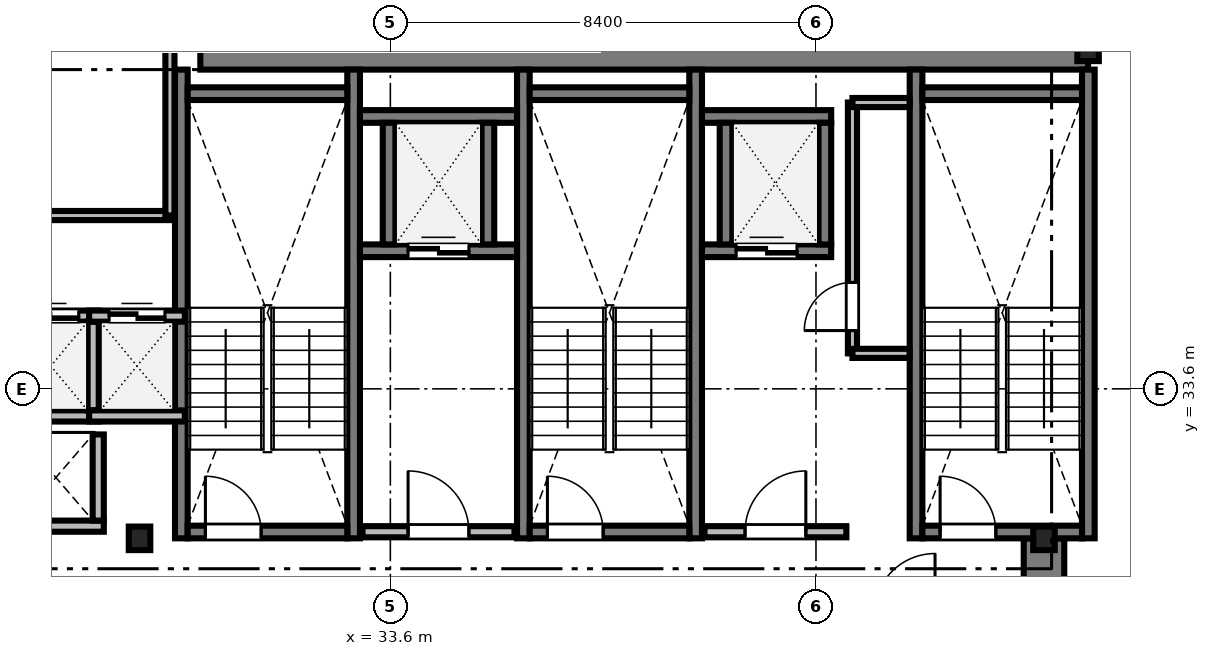
"""IFC4 building model, lengths in metres.
Left out: names, types, materials, properties, quantities, classifications, styles, units other than length and angle.
Written with IfcOpenShell. Run it as: python <this file> out.ifc"""

import sys

from ifc_helpers import new_model, si_unit, direction, frame, frame_2d, origin, origin_2d, place, context, subcontext, project, spatial, rectangle, i_section, extrude, source, transform, mapped, element, fill, save


model = new_model("IFC4")
c1 = context("Model", 3, precision=1e-05, world=origin(), true_north=direction((0.0, 1.0)))
c2 = subcontext(c1, "Body", "Model", "MODEL_VIEW")
j1 = project(units=[si_unit("LENGTHUNIT", "METRE"), si_unit("PLANEANGLEUNIT", "RADIAN")], contexts=[c1])
p1 = place(None, origin())
s1 = spatial("IfcSite", under=j1, at=p1, CompositionType="ELEMENT")
p2 = place(p1, origin())
s2 = spatial("IfcBuilding", under=s1, at=p2, CompositionType="ELEMENT")
p3 = place(p2, frame((0.0, 0.0, 155.7)))
s3 = spatial("IfcBuildingStorey", under=s2, at=p3, CompositionType="ELEMENT", Elevation=155.7)
m1 = source(origin(), c2, "Body", "SweptSolid", [
    extrude(rectangle(XDim=17.52, YDim=0.8, at=frame_2d((8.76, 0.0))), origin(), (0.0, 0.0, 1.0), 3.46),
])
p4 = place(p3, frame((29.85, 40.3, 0.0), z_axis=(0.0, 0.0, 1.0), x_axis=(1.0, 0.0, 0.0)))
e1 = element("IfcWall", 1, at=p4, inside=s3, PredefinedType="SHEAR", context=c2, shape_type="MappedRepresentation", body=[
    mapped(m1, transform((0.0, 0.0, 0.0), scale=1.0)),
])
m2 = source(origin(), c2, "Body", "SweptSolid", [
    extrude(rectangle(XDim=13.15, YDim=0.8, at=frame_2d((6.575, 0.0))), origin(), (0.0, 0.0, 1.0), 3.46),
])
p5 = place(p3, frame((46.5, 17.5, 0.0), z_axis=(0.0, 0.0, 1.0), x_axis=(0.0, 1.0, 0.0)))
e2 = element("IfcWall", 2, at=p5, inside=s3, PredefinedType="SHEAR", context=c2, shape_type="MappedRepresentation", body=[
    mapped(m2, transform((0.0, 0.0, 0.0), scale=1.0)),
])
m3 = source(origin(), c2, "Body", "SweptSolid", [
    extrude(i_section(OverallWidth=0.424, OverallDepth=0.465, WebThickness=0.035, FlangeThickness=0.056, FilletRadius=0.015, at=origin_2d()), origin(), (0.0, 0.0, 1.0), 3.46),
])
for number, where, z_axis, x_axis in (
    (3, (28.65, 30.65, 0.0), (0.0, 0.0, 1.0), (1.0, 0.0, 0.0)),
    (4, (46.5, 30.65, 0.0), (0.0, 0.0, 1.0), (1.0, 0.0, 0.0)),
    (5, (47.37, 40.3, 0.0), (0.0, 0.0, 1.0), (1.0, 0.0, 0.0)),
):
    element("IfcColumn", number, at=place(p3, frame(where, z_axis=z_axis, x_axis=x_axis)), inside=s3, PredefinedType="COLUMN", context=c2, shape_type="MappedRepresentation", body=[
        mapped(m3, transform((0.0, 0.0, 0.0), scale=1.0)),
    ])
m4 = source(origin(), c2, "Body", "SweptSolid", [
    extrude(rectangle(XDim=9.25, YDim=0.25, at=frame_2d((4.625, 0.0))), origin(), (0.0, 0.0, 1.0), 3.5),
])
for number, where, z_axis, x_axis in (
    (6, (29.475, 30.65, 0.0), (0.0, 0.0, 1.0), (0.0, 1.0, 0.0)),
    (7, (32.875, 30.65, 0.0), (0.0, 0.0, 1.0), (0.0, 1.0, 0.0)),
):
    element("IfcWall", number, at=place(p3, frame(where, z_axis=z_axis, x_axis=x_axis)), inside=s3, PredefinedType="SOLIDWALL", context=c2, shape_type="MappedRepresentation", body=[
        mapped(m4, transform((0.0, 0.0, 0.0), scale=1.0)),
    ])
m5 = source(origin(), c2, "Body", "SweptSolid", [
    extrude(rectangle(XDim=3.15, YDim=0.25, at=frame_2d((1.575, 0.0))), origin(), (0.0, 0.0, 1.0), 3.5),
])
p6 = place(p3, frame((29.6, 39.425, 0.0), z_axis=(0.0, 0.0, 1.0), x_axis=(1.0, 0.0, 0.0)))
e8 = element("IfcWall", 8, at=p6, inside=s3, PredefinedType="SOLIDWALL", context=c2, shape_type="MappedRepresentation", body=[
    mapped(m5, transform((0.0, 0.0, 0.0), scale=1.0)),
])
p7 = place(p3, frame((29.6, 30.775, 0.0), z_axis=(0.0, 0.0, 1.0), x_axis=(1.0, 0.0, 0.0)))
e9 = element("IfcWall", 9, at=p7, inside=s3, PredefinedType="SOLIDWALL", context=c2, shape_type="MappedRepresentation", body=[
    mapped(m5, transform((0.0, 0.0, 0.0), scale=1.0)),
])
m6 = source(origin(), c2, "Body", "SweptSolid", [
    extrude(rectangle(XDim=1.1, YDim=2.2, at=frame_2d((0.55, 1.1))), frame((0.0, 0.135, 0.0), z_axis=(0.0, -1.0, 0.0), x_axis=(1.0, 0.0, 0.0)), (0.0, 0.0, 1.0), 0.27),
])
p8 = place(p7, frame((0.35, 0.0, 0.0)))
e10 = element("IfcOpeningElement", 10, at=p8, cuts=e9, PredefinedType="OPENING", context=c2, shape_type="MappedRepresentation", body=[
    mapped(m6, transform((0.0, 0.0, 0.0), scale=1.0)),
])
for number, where, z_axis, x_axis in (
    (11, (36.225, 30.65, 0.0), (0.0, 0.0, 1.0), (0.0, 1.0, 0.0)),
    (12, (39.625, 30.65, 0.0), (0.0, 0.0, 1.0), (0.0, 1.0, 0.0)),
):
    element("IfcWall", number, at=place(p3, frame(where, z_axis=z_axis, x_axis=x_axis)), inside=s3, PredefinedType="SOLIDWALL", context=c2, shape_type="MappedRepresentation", body=[
        mapped(m4, transform((0.0, 0.0, 0.0), scale=1.0)),
    ])
p9 = place(p3, frame((36.35, 39.425, 0.0), z_axis=(0.0, 0.0, 1.0), x_axis=(1.0, 0.0, 0.0)))
e13 = element("IfcWall", 13, at=p9, inside=s3, PredefinedType="SOLIDWALL", context=c2, shape_type="MappedRepresentation", body=[
    mapped(m5, transform((0.0, 0.0, 0.0), scale=1.0)),
])
p10 = place(p3, frame((36.35, 30.775, 0.0), z_axis=(0.0, 0.0, 1.0), x_axis=(1.0, 0.0, 0.0)))
e14 = element("IfcWall", 14, at=p10, inside=s3, PredefinedType="SOLIDWALL", context=c2, shape_type="MappedRepresentation", body=[
    mapped(m5, transform((0.0, 0.0, 0.0), scale=1.0)),
])
p11 = place(p10, frame((0.35, 0.0, 0.0)))
e15 = element("IfcOpeningElement", 15, at=p11, cuts=e14, PredefinedType="OPENING", context=c2, shape_type="MappedRepresentation", body=[
    mapped(m6, transform((0.0, 0.0, 0.0), scale=1.0)),
])
for number, where, z_axis, x_axis in (
    (16, (43.975, 30.65, 0.0), (0.0, 0.0, 1.0), (0.0, 1.0, 0.0)),
    (17, (47.375, 30.65, 0.0), (0.0, 0.0, 1.0), (0.0, 1.0, 0.0)),
):
    element("IfcWall", number, at=place(p3, frame(where, z_axis=z_axis, x_axis=x_axis)), inside=s3, PredefinedType="SOLIDWALL", context=c2, shape_type="MappedRepresentation", body=[
        mapped(m4, transform((0.0, 0.0, 0.0), scale=1.0)),
    ])
p12 = place(p3, frame((44.1, 39.425, 0.0), z_axis=(0.0, 0.0, 1.0), x_axis=(1.0, 0.0, 0.0)))
e18 = element("IfcWall", 18, at=p12, inside=s3, PredefinedType="SOLIDWALL", context=c2, shape_type="MappedRepresentation", body=[
    mapped(m5, transform((0.0, 0.0, 0.0), scale=1.0)),
])
p13 = place(p3, frame((44.1, 30.775, 0.0), z_axis=(0.0, 0.0, 1.0), x_axis=(1.0, 0.0, 0.0)))
e19 = element("IfcWall", 19, at=p13, inside=s3, PredefinedType="SOLIDWALL", context=c2, shape_type="MappedRepresentation", body=[
    mapped(m5, transform((0.0, 0.0, 0.0), scale=1.0)),
])
p14 = place(p13, frame((0.35, 0.0, 0.0)))
e20 = element("IfcOpeningElement", 20, at=p14, cuts=e19, PredefinedType="OPENING", context=c2, shape_type="MappedRepresentation", body=[
    mapped(m6, transform((0.0, 0.0, 0.0), scale=1.0)),
])
m7 = source(origin(), c2, "Body", "SweptSolid", [
    extrude(rectangle(XDim=3.0, YDim=0.22, at=frame_2d((1.5, 0.0))), origin(), (0.0, 0.0, 1.0), 3.46),
])
p15 = place(p3, frame((33.05, 30.78, 0.0), z_axis=(0.0, 0.0, 1.0), x_axis=(1.0, 0.0, 0.0)))
e21 = element("IfcWall", 21, at=p15, inside=s3, PredefinedType="SOLIDWALL", context=c2, shape_type="MappedRepresentation", body=[
    mapped(m7, transform((0.0, 0.0, 0.0), scale=1.0)),
])
m8 = source(origin(), c2, "Body", "SweptSolid", [
    extrude(rectangle(XDim=1.2, YDim=2.2, at=frame_2d((0.6, 1.1))), frame((0.0, 0.12, 0.0), z_axis=(0.0, -1.0, 0.0), x_axis=(1.0, 0.0, 0.0)), (0.0, 0.0, 1.0), 0.24),
])
p16 = place(p15, frame((0.9, 0.0, 0.0)))
e22 = element("IfcOpeningElement", 22, at=p16, cuts=e21, PredefinedType="OPENING", context=c2, shape_type="MappedRepresentation", body=[
    mapped(m8, transform((0.0, 0.0, 0.0), scale=1.0)),
])
m9 = source(origin(), c2, "Body", "SweptSolid", [
    extrude(rectangle(XDim=2.8, YDim=0.22, at=frame_2d((1.4, 0.0))), origin(), (0.0, 0.0, 1.0), 3.46),
])
p17 = place(p3, frame((39.8, 30.78, 0.0), z_axis=(0.0, 0.0, 1.0), x_axis=(1.0, 0.0, 0.0)))
e23 = element("IfcWall", 23, at=p17, inside=s3, PredefinedType="SOLIDWALL", context=c2, shape_type="MappedRepresentation", body=[
    mapped(m9, transform((0.0, 0.0, 0.0), scale=1.0)),
])
p18 = place(p17, frame((0.8, 0.0, 0.0)))
e24 = element("IfcOpeningElement", 24, at=p18, cuts=e23, PredefinedType="OPENING", context=c2, shape_type="MappedRepresentation", body=[
    mapped(m8, transform((0.0, 0.0, 0.0), scale=1.0)),
])
m10 = source(origin(), c2, "Body", "SweptSolid", [
    extrude(rectangle(XDim=1.89, YDim=0.22, at=frame_2d((0.945, 0.0))), origin(), (0.0, 0.0, 1.0), 3.46),
])
p19 = place(p3, frame((25.955, 33.065, 0.0), z_axis=(0.0, 0.0, 1.0), x_axis=(1.0, 0.0, 0.0)))
e25 = element("IfcWall", 25, at=p19, inside=s3, PredefinedType="SOLIDWALL", context=c2, shape_type="MappedRepresentation", body=[
    mapped(m10, transform((0.0, 0.0, 0.0), scale=1.0)),
])
p20 = place(p3, frame((25.955, 35.035, 0.0), z_axis=(0.0, 0.0, 1.0), x_axis=(1.0, 0.0, 0.0)))
e26 = element("IfcWall", 26, at=p20, inside=s3, PredefinedType="SOLIDWALL", context=c2, shape_type="MappedRepresentation", body=[
    mapped(m10, transform((0.0, 0.0, 0.0), scale=1.0)),
])
m11 = source(origin(), c2, "Body", "SweptSolid", [
    extrude(rectangle(XDim=1.1, YDim=2.2, at=frame_2d((0.55, 1.1))), frame((0.0, 0.12, 0.0), z_axis=(0.0, -1.0, 0.0), x_axis=(1.0, 0.0, 0.0)), (0.0, 0.0, 1.0), 0.24),
])
p21 = place(p20, frame((0.395, 0.0, 0.0)))
e27 = element("IfcOpeningElement", 27, at=p21, cuts=e26, PredefinedType="OPENING", context=c2, shape_type="MappedRepresentation", body=[
    mapped(m11, transform((0.0, 0.0, 0.0), scale=1.0)),
])
m12 = source(origin(), c2, "Body", "SweptSolid", [
    extrude(rectangle(XDim=1.75, YDim=0.22, at=frame_2d((0.875, 0.0))), origin(), (0.0, 0.0, 1.0), 3.46),
])
p22 = place(p3, frame((27.735, 33.175, 0.0), z_axis=(0.0, 0.0, 1.0), x_axis=(0.0, 1.0, 0.0)))
e28 = element("IfcWall", 28, at=p22, inside=s3, PredefinedType="SOLIDWALL", context=c2, shape_type="MappedRepresentation", body=[
    mapped(m12, transform((0.0, 0.0, 0.0), scale=1.0)),
])
p23 = place(p3, frame((27.655, 33.065, 0.0), z_axis=(0.0, 0.0, 1.0), x_axis=(1.0, 0.0, 0.0)))
e29 = element("IfcWall", 29, at=p23, inside=s3, PredefinedType="SOLIDWALL", context=c2, shape_type="MappedRepresentation", body=[
    mapped(m10, transform((0.0, 0.0, 0.0), scale=1.0)),
])
p24 = place(p3, frame((27.655, 35.035, 0.0), z_axis=(0.0, 0.0, 1.0), x_axis=(1.0, 0.0, 0.0)))
e30 = element("IfcWall", 30, at=p24, inside=s3, PredefinedType="SOLIDWALL", context=c2, shape_type="MappedRepresentation", body=[
    mapped(m10, transform((0.0, 0.0, 0.0), scale=1.0)),
])
p25 = place(p24, frame((0.395, 0.0, 0.0)))
e31 = element("IfcOpeningElement", 31, at=p25, cuts=e30, PredefinedType="OPENING", context=c2, shape_type="MappedRepresentation", body=[
    mapped(m11, transform((0.0, 0.0, 0.0), scale=1.0)),
])
m13 = source(origin(), c2, "Body", "SweptSolid", [
    extrude(rectangle(XDim=3.1, YDim=0.25, at=frame_2d((1.55, 0.0))), origin(), (0.0, 0.0, 1.0), 3.46),
])
p26 = place(p3, frame((33.0, 36.325, 0.0), z_axis=(0.0, 0.0, 1.0), x_axis=(1.0, 0.0, 0.0)))
e32 = element("IfcWall", 32, at=p26, inside=s3, PredefinedType="SOLIDWALL", context=c2, shape_type="MappedRepresentation", body=[
    mapped(m13, transform((0.0, 0.0, 0.0), scale=1.0)),
])
m14 = source(origin(), c2, "Body", "SweptSolid", [
    extrude(rectangle(XDim=1.2, YDim=2.25, at=frame_2d((0.6, 1.125))), frame((0.0, 0.135, 0.0), z_axis=(0.0, -1.0, 0.0), x_axis=(1.0, 0.0, 0.0)), (0.0, 0.0, 1.0), 0.27),
])
p27 = place(p26, frame((0.95, 0.0, 0.0)))
e33 = element("IfcOpeningElement", 33, at=p27, cuts=e32, PredefinedType="OPENING", context=c2, shape_type="MappedRepresentation", body=[
    mapped(m14, transform((0.0, 0.0, 0.0), scale=1.0)),
])
p28 = place(p3, frame((33.0, 38.975, 0.0), z_axis=(0.0, 0.0, 1.0), x_axis=(1.0, 0.0, 0.0)))
e34 = element("IfcWall", 34, at=p28, inside=s3, PredefinedType="SOLIDWALL", context=c2, shape_type="MappedRepresentation", body=[
    mapped(m13, transform((0.0, 0.0, 0.0), scale=1.0)),
])
m15 = source(origin(), c2, "Body", "SweptSolid", [
    extrude(rectangle(XDim=2.4, YDim=0.25, at=frame_2d((1.2, 0.0))), origin(), (0.0, 0.0, 1.0), 3.46),
])
for number, where, z_axis, x_axis in (
    (35, (33.575, 36.45, 0.0), (0.0, 0.0, 1.0), (0.0, 1.0, 0.0)),
    (36, (35.525, 36.45, 0.0), (0.0, 0.0, 1.0), (0.0, 1.0, 0.0)),
):
    element("IfcWall", number, at=place(p3, frame(where, z_axis=z_axis, x_axis=x_axis)), inside=s3, PredefinedType="SOLIDWALL", context=c2, shape_type="MappedRepresentation", body=[
        mapped(m15, transform((0.0, 0.0, 0.0), scale=1.0)),
    ])
m16 = source(origin(), c2, "Body", "SweptSolid", [
    extrude(rectangle(XDim=2.55, YDim=0.25, at=frame_2d((1.275, 0.0))), origin(), (0.0, 0.0, 1.0), 3.46),
])
p29 = place(p3, frame((39.75, 36.325, 0.0), z_axis=(0.0, 0.0, 1.0), x_axis=(1.0, 0.0, 0.0)))
e37 = element("IfcWall", 37, at=p29, inside=s3, PredefinedType="SOLIDWALL", context=c2, shape_type="MappedRepresentation", body=[
    mapped(m16, transform((0.0, 0.0, 0.0), scale=1.0)),
])
p30 = place(p29, frame((0.675, 0.0, 0.0)))
e38 = element("IfcOpeningElement", 38, at=p30, cuts=e37, PredefinedType="OPENING", context=c2, shape_type="MappedRepresentation", body=[
    mapped(m14, transform((0.0, 0.0, 0.0), scale=1.0)),
])
p31 = place(p3, frame((39.75, 38.975, 0.0), z_axis=(0.0, 0.0, 1.0), x_axis=(1.0, 0.0, 0.0)))
e39 = element("IfcWall", 39, at=p31, inside=s3, PredefinedType="SOLIDWALL", context=c2, shape_type="MappedRepresentation", body=[
    mapped(m16, transform((0.0, 0.0, 0.0), scale=1.0)),
])
for number, where, z_axis, x_axis in (
    (40, (40.225, 36.45, 0.0), (0.0, 0.0, 1.0), (0.0, 1.0, 0.0)),
    (41, (42.175, 36.45, 0.0), (0.0, 0.0, 1.0), (0.0, 1.0, 0.0)),
):
    element("IfcWall", number, at=place(p3, frame(where, z_axis=z_axis, x_axis=x_axis)), inside=s3, PredefinedType="SOLIDWALL", context=c2, shape_type="MappedRepresentation", body=[
        mapped(m15, transform((0.0, 0.0, 0.0), scale=1.0)),
    ])
m17 = source(origin(), c2, "Body", "SweptSolid", [
    extrude(rectangle(XDim=1.89, YDim=0.22, at=frame_2d((0.945, 0.0))), origin(), (0.0, 0.0, 1.0), 3.46),
])
p32 = place(p3, frame((26.055, 30.89, 0.0), z_axis=(0.0, 0.0, 1.0), x_axis=(1.0, 0.0, 0.0)))
e42 = element("IfcWall", 42, at=p32, inside=s3, PredefinedType="SOLIDWALL", context=c2, shape_type="MappedRepresentation", body=[
    mapped(m17, transform((0.0, 0.0, 0.0), scale=1.0)),
])
m18 = source(origin(), c2, "Body", "SweptSolid", [
    extrude(rectangle(XDim=1.7, YDim=0.22, at=frame_2d((0.85, 0.0))), origin(), (0.0, 0.0, 1.0), 3.46),
])
p33 = place(p3, frame((27.835, 31.0, 0.0), z_axis=(0.0, 0.0, 1.0), x_axis=(0.0, 1.0, 0.0)))
e43 = element("IfcWall", 43, at=p33, inside=s3, PredefinedType="SOLIDWALL", context=c2, shape_type="MappedRepresentation", body=[
    mapped(m18, transform((0.0, 0.0, 0.0), scale=1.0)),
])
m19 = source(origin(), c2, "Body", "SweptSolid", [
    extrude(rectangle(XDim=22.328, YDim=0.18, at=frame_2d((11.164, 0.0))), origin(), (0.0, 0.0, 1.0), 2.702),
])
p34 = place(p3, frame((6.922, 37.02, 0.0), z_axis=(0.0, 0.0, 1.0), x_axis=(1.0, 0.0, 0.0)))
e44 = element("IfcWall", 44, at=p34, inside=s3, PredefinedType="PARTITIONING", context=c2, shape_type="MappedRepresentation", body=[
    mapped(m19, transform((0.0, 0.0, 0.0), scale=1.0)),
])
m20 = source(origin(), c2, "Body", "SweptSolid", [
    extrude(rectangle(XDim=1.05, YDim=2.2, at=frame_2d((0.525, 1.1))), frame((0.0, 0.1, 0.0), z_axis=(0.0, -1.0, 0.0), x_axis=(1.0, 0.0, 0.0)), (0.0, 0.0, 1.0), 0.2),
])
p35 = place(p34, frame((14.928, 0.0, 0.0)))
e45 = element("IfcOpeningElement", 45, at=p35, cuts=e44, PredefinedType="OPENING", context=c2, shape_type="MappedRepresentation", body=[
    mapped(m20, transform((0.0, 0.0, 0.0), scale=1.0)),
])
m21 = source(origin(), c2, "Body", "SweptSolid", [
    extrude(rectangle(XDim=4.95, YDim=0.18, at=frame_2d((2.475, 0.0))), origin(), (0.0, 0.0, 1.0), 3.46),
])
p36 = place(p3, frame((42.72, 34.3, 0.0), z_axis=(0.0, 0.0, 1.0), x_axis=(0.0, 1.0, 0.0)))
e46 = element("IfcWall", 46, at=p36, inside=s3, PredefinedType="PARTITIONING", context=c2, shape_type="MappedRepresentation", body=[
    mapped(m21, transform((0.0, 0.0, 0.0), scale=1.0)),
])
m22 = source(origin(), c2, "Body", "SweptSolid", [
    extrude(rectangle(XDim=0.95, YDim=2.15, at=frame_2d((0.475, 1.075))), frame((0.0, 0.1, 0.0), z_axis=(0.0, -1.0, 0.0), x_axis=(1.0, 0.0, 0.0)), (0.0, 0.0, 1.0), 0.2),
])
p37 = place(p36, frame((0.45, 0.0, 0.0)))
e47 = element("IfcOpeningElement", 47, at=p37, cuts=e46, PredefinedType="OPENING", context=c2, shape_type="MappedRepresentation", body=[
    mapped(m22, transform((0.0, 0.0, 0.0), scale=1.0)),
])
m23 = source(origin(), c2, "Body", "SweptSolid", [
    extrude(rectangle(XDim=11.45, YDim=0.18, at=frame_2d((5.725, 0.0))), origin(), (0.0, 0.0, 1.0), 2.702),
])
p38 = place(p3, frame((29.25, 37.02, 0.0), z_axis=(0.0, 0.0, 1.0), x_axis=(0.0, 1.0, 0.0)))
e48 = element("IfcWall", 48, at=p38, inside=s3, PredefinedType="PARTITIONING", context=c2, shape_type="MappedRepresentation", body=[
    mapped(m23, transform((0.0, 0.0, 0.0), scale=1.0)),
])
m24 = source(origin(), c2, "Body", "SweptSolid", [
    extrude(rectangle(XDim=1.128, YDim=0.18, at=frame_2d((0.564, 0.0))), origin(), (0.0, 0.0, 1.0), 3.46),
])
for number, where, z_axis, x_axis in (
    (49, (42.72, 34.3, 0.0), (0.0, 0.0, 1.0), (1.0, 0.0, 0.0)),
    (50, (42.72, 39.25, 0.0), (0.0, 0.0, 1.0), (1.0, 0.0, 0.0)),
):
    element("IfcWall", number, at=place(p3, frame(where, z_axis=z_axis, x_axis=x_axis)), inside=s3, PredefinedType="PARTITIONING", context=c2, shape_type="MappedRepresentation", body=[
        mapped(m24, transform((0.0, 0.0, 0.0), scale=1.0)),
    ])
m25 = source(origin(), c2, "Body", "SweptSolid", [
    extrude(rectangle(XDim=1.1, YDim=2.2, at=frame_2d((0.55, 1.1))), frame((0.0, 0.025, 0.0), z_axis=(0.0, -1.0, 0.0), x_axis=(1.0, 0.0, 0.0)), (0.0, 0.0, 1.0), 0.05),
])
p39 = place(p8, origin())
e51 = element("IfcDoor", 51, at=p39, inside=s3, OperationType="SINGLE_SWING_LEFT", PredefinedType="DOOR", context=c2, shape_type="MappedRepresentation", body=[
    mapped(m25, transform((0.0, 0.0, 0.0), scale=1.0)),
])
fill(e10, e51)
p40 = place(p11, origin())
e52 = element("IfcDoor", 52, at=p40, inside=s3, OperationType="SINGLE_SWING_LEFT", PredefinedType="DOOR", context=c2, shape_type="MappedRepresentation", body=[
    mapped(m25, transform((0.0, 0.0, 0.0), scale=1.0)),
])
fill(e15, e52)
p41 = place(p14, origin())
e53 = element("IfcDoor", 53, at=p41, inside=s3, OperationType="SINGLE_SWING_LEFT", PredefinedType="DOOR", context=c2, shape_type="MappedRepresentation", body=[
    mapped(m25, transform((0.0, 0.0, 0.0), scale=1.0)),
])
fill(e20, e53)
m26 = source(origin(), c2, "Body", "SweptSolid", [
    extrude(rectangle(XDim=1.2, YDim=2.2, at=frame_2d((0.6, 1.1))), frame((0.0, 0.025, 0.0), z_axis=(0.0, -1.0, 0.0), x_axis=(1.0, 0.0, 0.0)), (0.0, 0.0, 1.0), 0.05),
])
p42 = place(p16, origin())
e54 = element("IfcDoor", 54, at=p42, inside=s3, OperationType="SINGLE_SWING_LEFT", PredefinedType="DOOR", context=c2, shape_type="MappedRepresentation", body=[
    mapped(m26, transform((0.0, 0.0, 0.0), scale=1.0)),
])
fill(e22, e54)
p43 = place(p18, origin())
e55 = element("IfcDoor", 55, at=p43, inside=s3, OperationType="SINGLE_SWING_RIGHT", PredefinedType="DOOR", context=c2, shape_type="MappedRepresentation", body=[
    mapped(m26, transform((0.0, 0.0, 0.0), scale=1.0)),
])
fill(e24, e55)
p44 = place(p21, origin())
e56 = element("IfcDoor", 56, at=p44, inside=s3, OperationType="DOUBLE_DOOR_SLIDING", PredefinedType="DOOR", context=c2, shape_type="MappedRepresentation", body=[
    mapped(m25, transform((0.0, 0.0, 0.0), scale=1.0)),
])
fill(e27, e56)
p45 = place(p25, origin())
e57 = element("IfcDoor", 57, at=p45, inside=s3, OperationType="DOUBLE_DOOR_SLIDING", PredefinedType="DOOR", context=c2, shape_type="MappedRepresentation", body=[
    mapped(m25, transform((0.0, 0.0, 0.0), scale=1.0)),
])
fill(e31, e57)
m27 = source(origin(), c2, "Body", "SweptSolid", [
    extrude(rectangle(XDim=1.2, YDim=2.25, at=frame_2d((0.6, 1.125))), frame((0.0, 0.025, 0.0), z_axis=(0.0, -1.0, 0.0), x_axis=(1.0, 0.0, 0.0)), (0.0, 0.0, 1.0), 0.05),
])
p46 = place(p27, origin())
e58 = element("IfcDoor", 58, at=p46, inside=s3, OperationType="DOUBLE_DOOR_SLIDING", PredefinedType="DOOR", context=c2, shape_type="MappedRepresentation", body=[
    mapped(m27, transform((0.0, 0.0, 0.0), scale=1.0)),
])
fill(e33, e58)
p47 = place(p30, origin())
e59 = element("IfcDoor", 59, at=p47, inside=s3, OperationType="DOUBLE_DOOR_SLIDING", PredefinedType="DOOR", context=c2, shape_type="MappedRepresentation", body=[
    mapped(m27, transform((0.0, 0.0, 0.0), scale=1.0)),
])
fill(e38, e59)
m28 = source(origin(), c2, "Body", "SweptSolid", [
    extrude(rectangle(XDim=0.95, YDim=2.15, at=frame_2d((0.475, 1.075))), frame((0.0, 0.025, 0.0), z_axis=(0.0, -1.0, 0.0), x_axis=(1.0, 0.0, 0.0)), (0.0, 0.0, 1.0), 0.05),
])
p48 = place(p37, origin())
e60 = element("IfcDoor", 60, at=p48, inside=s3, OperationType="SINGLE_SWING_LEFT", PredefinedType="DOOR", context=c2, shape_type="MappedRepresentation", body=[
    mapped(m28, transform((0.0, 0.0, 0.0), scale=1.0)),
])
fill(e47, e60)
save(model, sys.argv[1])
